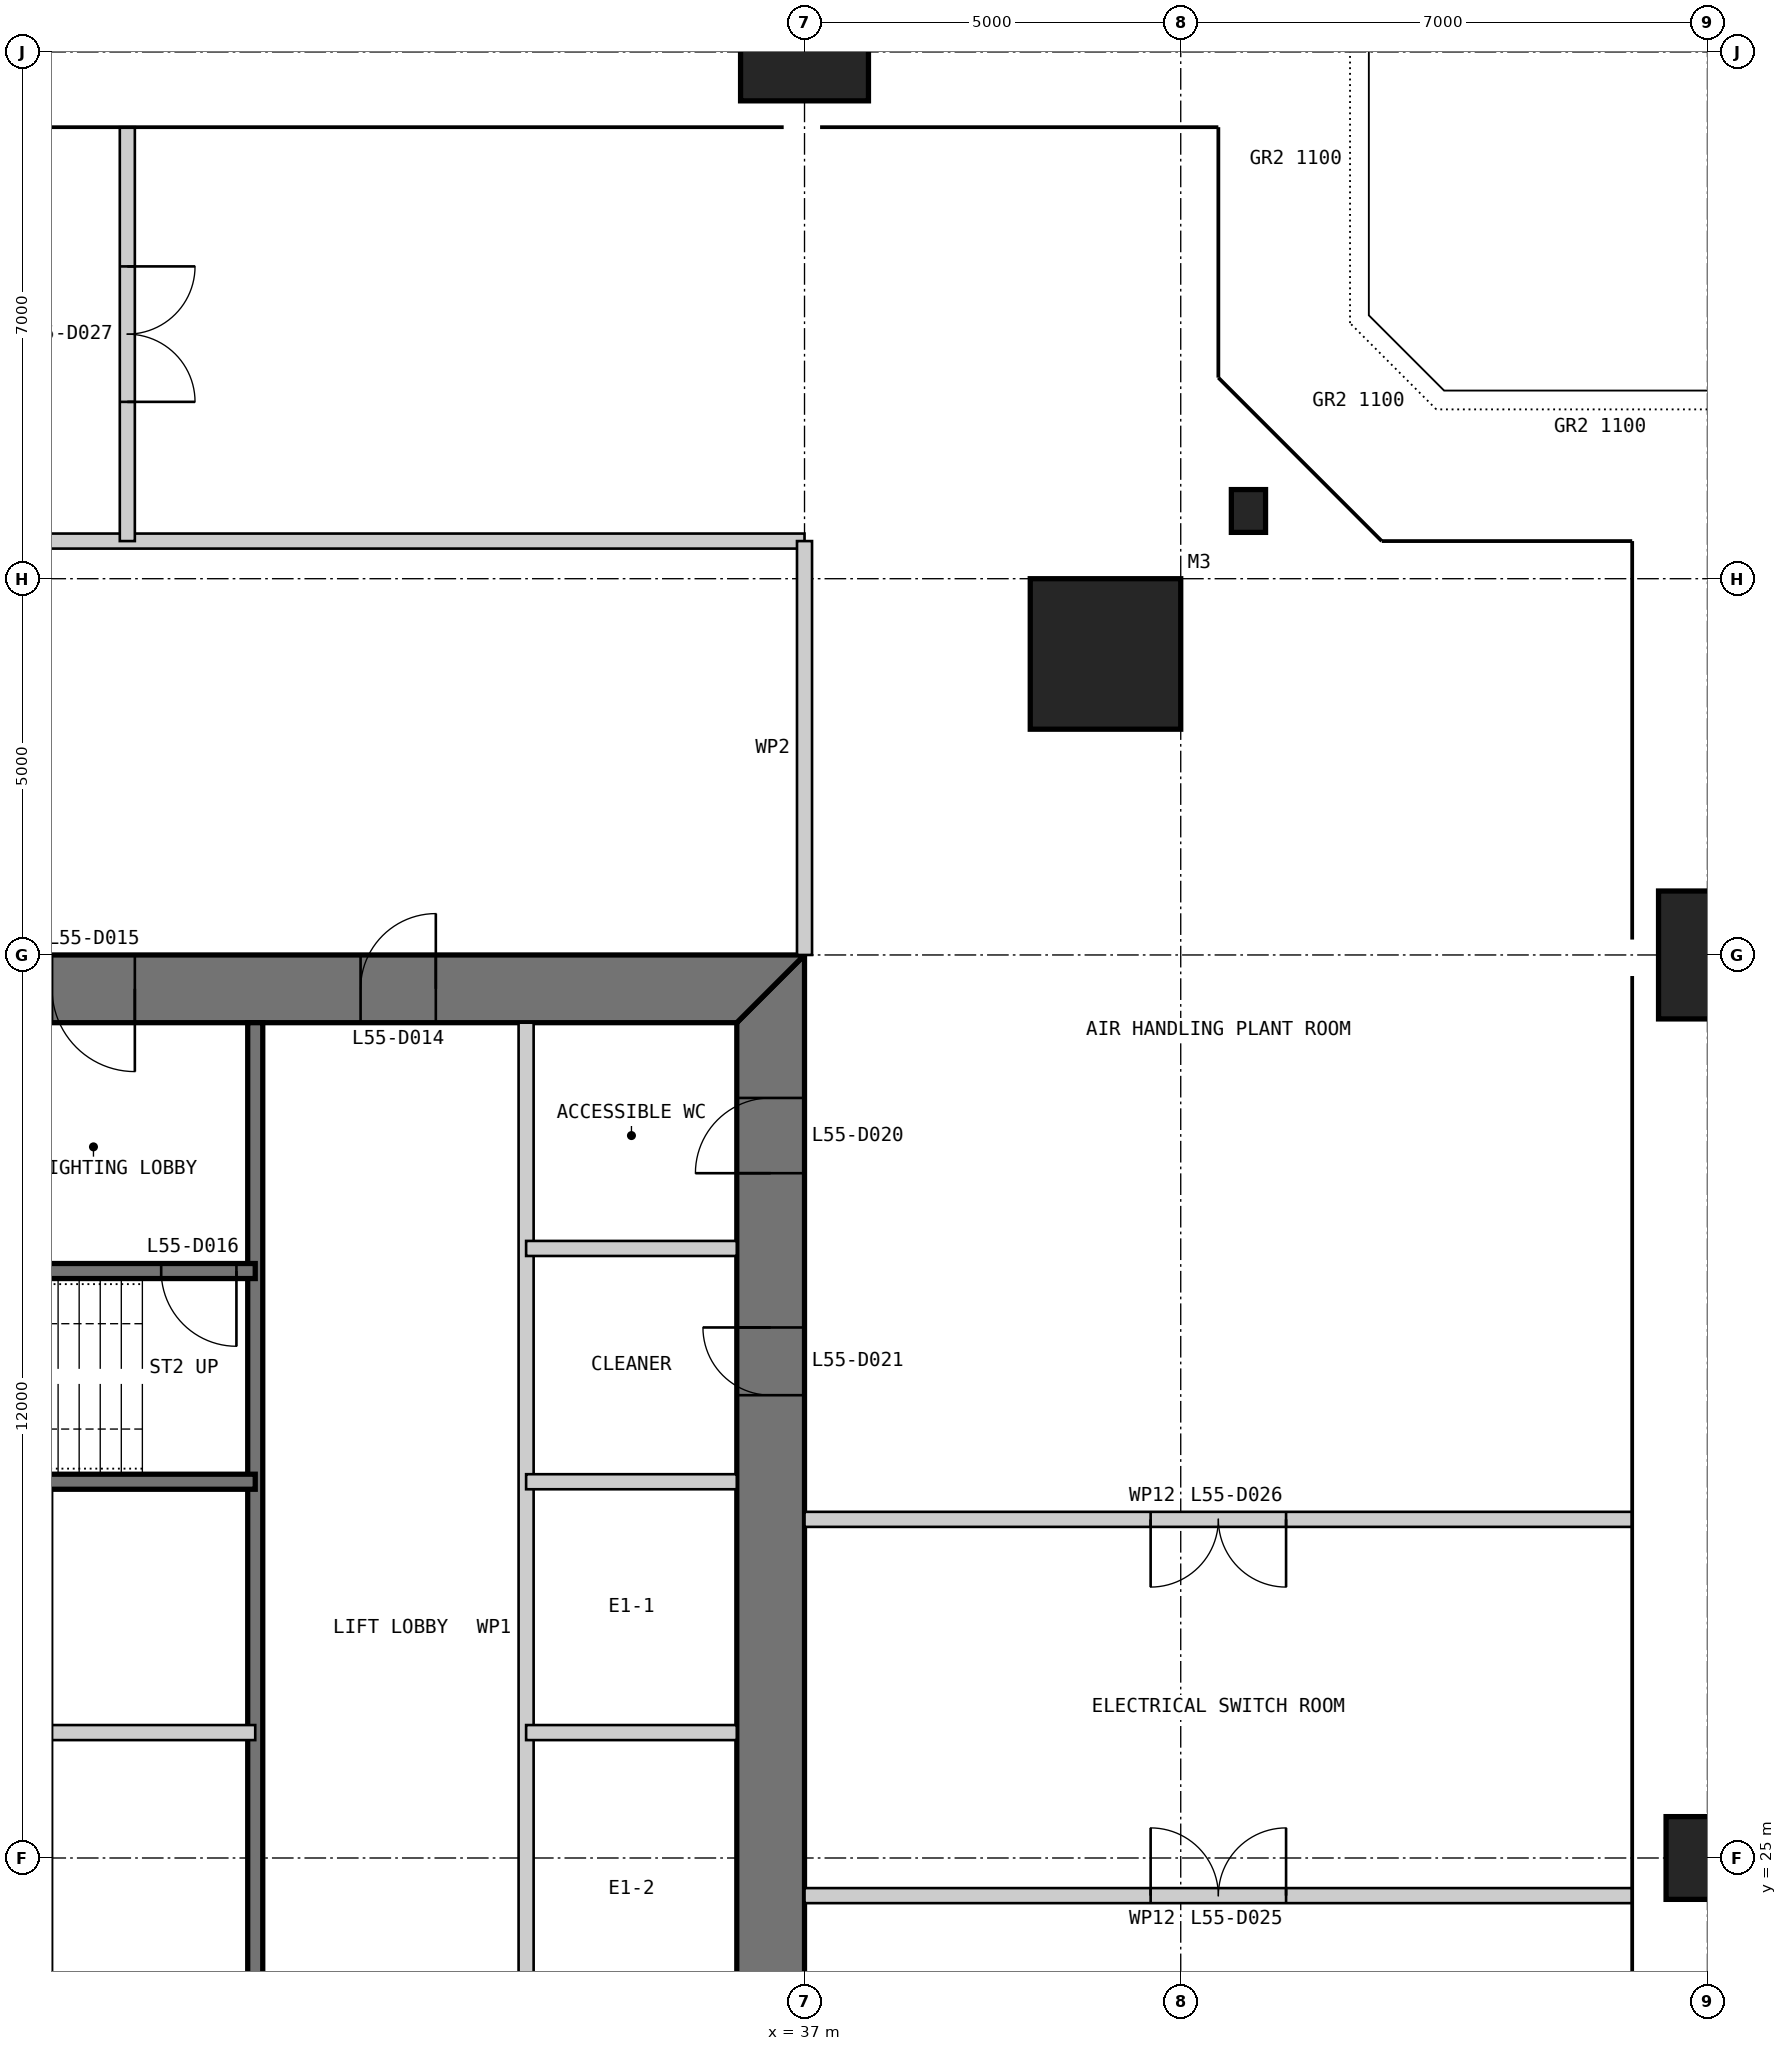
"""IFC4 building model, lengths in metres.
Left out: names, types, materials, properties, quantities, classifications, styles, units other than length and angle.
Written with IfcOpenShell. Run it as: python <this file> out.ifc"""

import sys

from ifc_helpers import new_model, si_unit, direction, frame, frame_2d, origin, origin_2d, place, context, subcontext, project, spatial, polyline, rectangle, i_section, outline, extrude, element, fill, save


model = new_model("IFC4")
c1 = context("Model", 3, precision=1e-05, world=origin(), true_north=direction((0.0, 1.0)))
c2 = subcontext(c1, "Body", "Model", "MODEL_VIEW")
j1 = project(units=[si_unit("LENGTHUNIT", "METRE"), si_unit("PLANEANGLEUNIT", "RADIAN")], contexts=[c1])
p1 = place(None, origin())
s1 = spatial("IfcSite", under=j1, at=p1, CompositionType="ELEMENT")
p2 = place(p1, origin())
s2 = spatial("IfcBuilding", under=s1, at=p2, CompositionType="ELEMENT")
p3 = place(p2, frame((0.0, 0.0, 233.8)))
s3 = spatial("IfcBuildingStorey", under=s2, at=p3, CompositionType="ELEMENT", Elevation=233.8)
p4 = place(p3, frame((41.0, 41.0, 0.0), z_axis=(0.0, 0.0, 1.0), x_axis=(1.0, 0.0, 0.0)))
e1 = element("IfcColumn", 1, at=p4, inside=s3, PredefinedType="COLUMN", context=c2, shape_type="SweptSolid", body=[
    extrude(rectangle(XDim=2.0, YDim=2.0, at=origin_2d()), origin(), (0.0, 0.0, 1.0), 6.0),
])
p5 = place(p3, frame((49.0, 25.0, 0.0), z_axis=(0.0, 0.0, 1.0), x_axis=(1.0, 0.0, 0.0)))
e2 = element("IfcColumn", 2, at=p5, inside=s3, PredefinedType="COLUMN", context=c2, shape_type="SweptSolid", body=[
    extrude(rectangle(XDim=1.1, YDim=1.1, at=origin_2d()), origin(), (0.0, 0.0, 1.0), 6.0),
])
p6 = place(p3, frame((49.0, 37.0, 0.0), z_axis=(0.0, 0.0, 1.0), x_axis=(1.0, 0.0, 0.0)))
e3 = element("IfcColumn", 3, at=p6, inside=s3, PredefinedType="COLUMN", context=c2, shape_type="SweptSolid", body=[
    extrude(rectangle(XDim=1.3, YDim=1.7, at=origin_2d()), origin(), (0.0, 0.0, 1.0), 6.0),
])
p7 = place(p3, frame((37.0, 49.0, 0.0), z_axis=(0.0, 0.0, 1.0), x_axis=(1.0, 0.0, 0.0)))
e4 = element("IfcColumn", 4, at=p7, inside=s3, PredefinedType="COLUMN", context=c2, shape_type="SweptSolid", body=[
    extrude(rectangle(XDim=1.7, YDim=1.3, at=origin_2d()), origin(), (0.0, 0.0, 1.0), 6.0),
])
p8 = place(p3, frame((42.9, 42.9, 0.0), z_axis=(0.0, 0.0, 1.0), x_axis=(1.0, 0.0, 0.0)))
e5 = element("IfcColumn", 5, at=p8, inside=s3, PredefinedType="COLUMN", context=c2, shape_type="SweptSolid", body=[
    extrude(i_section(OverallWidth=0.455, OverallDepth=0.569, WebThickness=0.078, FlangeThickness=0.125, at=origin_2d()), origin(), (0.0, 0.0, 1.0), 4.6),
])
p9 = place(p3, frame((36.55, 13.9, 0.0), z_axis=(0.0, 0.0, 1.0), x_axis=(0.0, 1.0, 0.0)))
e6 = element("IfcWall", 6, at=p9, inside=s3, PredefinedType="SHEAR", context=c2, shape_type="SweptSolid", body=[
    extrude(outline(polyline([(-0.9, -0.45), (23.1, -0.45), (22.2, 0.45), (0.0, 0.45), (-0.9, -0.45)])), origin(), (0.0, 0.0, 1.0), 6.0),
])
p10 = place(p9, frame((20.2, 0.0, 0.0)))
e7 = element("IfcOpeningElement", 7, at=p10, cuts=e6, PredefinedType="OPENING", context=c2, shape_type="SweptSolid", body=[
    extrude(rectangle(XDim=1.0, YDim=2.2, at=frame_2d((0.5, 1.1))), frame((0.0, 0.46, 0.0), z_axis=(0.0, -1.0, 0.0), x_axis=(1.0, 0.0, 0.0)), (0.0, 0.0, 1.0), 0.92),
])
p11 = place(p9, frame((17.25, 0.0, 0.0)))
e8 = element("IfcOpeningElement", 8, at=p11, cuts=e6, PredefinedType="OPENING", context=c2, shape_type="SweptSolid", body=[
    extrude(rectangle(XDim=0.9, YDim=2.2, at=frame_2d((0.45, 1.1))), frame((0.0, 0.46, 0.0), z_axis=(0.0, -1.0, 0.0), x_axis=(1.0, 0.0, 0.0)), (0.0, 0.0, 1.0), 0.92),
])
p12 = place(p3, frame((37.0, 36.55, 0.0), z_axis=(0.0, 0.0, 1.0), x_axis=(-1.0, 0.0, 0.0)))
e9 = element("IfcWall", 9, at=p12, inside=s3, PredefinedType="SHEAR", context=c2, shape_type="SweptSolid", body=[
    extrude(outline(polyline([(0.0, -0.45), (24.0, -0.45), (23.1, 0.45), (0.9, 0.45), (0.0, -0.45)])), origin(), (0.0, 0.0, 1.0), 6.0),
])
p13 = place(p12, frame((4.9, 0.0, 0.0)))
e10 = element("IfcOpeningElement", 10, at=p13, cuts=e9, PredefinedType="OPENING", context=c2, shape_type="SweptSolid", body=[
    extrude(rectangle(XDim=1.0, YDim=2.2, at=frame_2d((0.5, 1.1))), frame((0.0, 0.46, 0.0), z_axis=(0.0, -1.0, 0.0), x_axis=(1.0, 0.0, 0.0)), (0.0, 0.0, 1.0), 0.92),
])
p14 = place(p12, frame((8.9, 0.0, 0.0)))
e11 = element("IfcOpeningElement", 11, at=p14, cuts=e9, PredefinedType="OPENING", context=c2, shape_type="SweptSolid", body=[
    extrude(rectangle(XDim=1.1, YDim=2.2, at=frame_2d((0.55, 1.1))), frame((0.0, 0.46, 0.0), z_axis=(0.0, -1.0, 0.0), x_axis=(1.0, 0.0, 0.0)), (0.0, 0.0, 1.0), 0.92),
])
p15 = place(p12, frame((15.05, 0.0, 0.0)))
e12 = element("IfcOpeningElement", 12, at=p15, cuts=e9, PredefinedType="OPENING", context=c2, shape_type="SweptSolid", body=[
    extrude(rectangle(XDim=0.9, YDim=2.2, at=frame_2d((0.45, 1.1))), frame((0.0, 0.46, 0.0), z_axis=(0.0, -1.0, 0.0), x_axis=(1.0, 0.0, 0.0)), (0.0, 0.0, 1.0), 0.92),
])
p16 = place(p12, frame((17.9, 0.0, 0.0)))
e13 = element("IfcOpeningElement", 13, at=p16, cuts=e9, PredefinedType="OPENING", context=c2, shape_type="SweptSolid", body=[
    extrude(rectangle(XDim=1.0, YDim=2.2, at=frame_2d((0.5, 1.1))), frame((0.0, 0.46, 0.0), z_axis=(0.0, -1.0, 0.0), x_axis=(1.0, 0.0, 0.0)), (0.0, 0.0, 1.0), 0.92),
])
p17 = place(p12, frame((21.4, 0.0, 0.0)))
e14 = element("IfcOpeningElement", 14, at=p17, cuts=e9, PredefinedType="OPENING", context=c2, shape_type="SweptSolid", body=[
    extrude(rectangle(XDim=1.0, YDim=2.2, at=frame_2d((0.5, 1.1))), frame((0.0, 0.46, 0.0), z_axis=(0.0, -1.0, 0.0), x_axis=(1.0, 0.0, 0.0)), (0.0, 0.0, 1.0), 0.92),
])
p18 = place(p3, frame((33.3, 36.1, 0.0), z_axis=(0.0, 0.0, 1.0), x_axis=(0.0, -1.0, 0.0)))
e15 = element("IfcWall", 15, at=p18, inside=s3, PredefinedType="PARTITIONING", context=c2, shape_type="SweptSolid", body=[
    extrude(rectangle(XDim=16.1, YDim=0.2, at=frame_2d((8.05, 0.0))), origin(), (0.0, 0.0, 1.0), 5.8),
])
p19 = place(p3, frame((29.7, 36.1, 0.0), z_axis=(0.0, 0.0, 1.0), x_axis=(0.0, -1.0, 0.0)))
e16 = element("IfcWall", 16, at=p19, inside=s3, PredefinedType="SOLIDWALL", context=c2, shape_type="SweptSolid", body=[
    extrude(rectangle(XDim=16.1, YDim=0.2, at=frame_2d((8.05, 0.0))), origin(), (0.0, 0.0, 1.0), 5.8),
])
for number, where, z_axis, x_axis in (
    (17, (36.1, 30.0, 0.0), (0.0, 0.0, 1.0), (-1.0, 0.0, 0.0)),
    (18, (36.1, 26.667, 0.0), (0.0, 0.0, 1.0), (-1.0, 0.0, 0.0)),
    (19, (29.7, 26.667, 0.0), (0.0, 0.0, 1.0), (-1.0, 0.0, 0.0)),
):
    element("IfcWall", number, at=place(p3, frame(where, z_axis=z_axis, x_axis=x_axis)), inside=s3, PredefinedType="PARTITIONING", context=c2, shape_type="SweptSolid", body=[
        extrude(rectangle(XDim=2.8, YDim=0.2, at=frame_2d((1.4, 0.0))), origin(), (0.0, 0.0, 1.0), 5.8),
    ])
p20 = place(p3, frame((29.7, 32.8, 0.0), z_axis=(0.0, 0.0, 1.0), x_axis=(-1.0, 0.0, 0.0)))
e20 = element("IfcWall", 20, at=p20, inside=s3, PredefinedType="SOLIDWALL", context=c2, shape_type="SweptSolid", body=[
    extrude(rectangle(XDim=9.4, YDim=0.2, at=frame_2d((4.7, 0.0))), origin(), (0.0, 0.0, 1.0), 5.8),
])
p21 = place(p20, frame((0.25, 0.0, 0.0)))
e21 = element("IfcOpeningElement", 21, at=p21, cuts=e20, PredefinedType="OPENING", context=c2, shape_type="SweptSolid", body=[
    extrude(rectangle(XDim=1.0, YDim=2.2, at=frame_2d((0.5, 1.1))), frame((0.0, 0.11, 0.0), z_axis=(0.0, -1.0, 0.0), x_axis=(1.0, 0.0, 0.0)), (0.0, 0.0, 1.0), 0.22),
])
p22 = place(p3, frame((29.7, 30.0, 0.0), z_axis=(0.0, 0.0, 1.0), x_axis=(-1.0, 0.0, 0.0)))
e22 = element("IfcWall", 22, at=p22, inside=s3, PredefinedType="SOLIDWALL", context=c2, shape_type="SweptSolid", body=[
    extrude(rectangle(XDim=15.8, YDim=0.2, at=frame_2d((7.9, 0.0))), origin(), (0.0, 0.0, 1.0), 5.8),
])
p23 = place(p3, frame((36.1, 33.1, 0.0), z_axis=(0.0, 0.0, 1.0), x_axis=(-1.0, 0.0, 0.0)))
e23 = element("IfcWall", 23, at=p23, inside=s3, PredefinedType="PARTITIONING", context=c2, shape_type="SweptSolid", body=[
    extrude(rectangle(XDim=2.8, YDim=0.2, at=frame_2d((1.4, 0.0))), origin(), (0.0, 0.0, 1.0), 5.8),
])
p24 = place(p3, frame((13.0, 42.5, 0.0), z_axis=(0.0, 0.0, 1.0), x_axis=(1.0, 0.0, 0.0)))
e24 = element("IfcWall", 24, at=p24, inside=s3, PredefinedType="PARTITIONING", context=c2, shape_type="SweptSolid", body=[
    extrude(rectangle(XDim=24.0, YDim=0.2, at=frame_2d((12.0, 0.0))), origin(), (0.0, 0.0, 1.0), 5.8),
])
p25 = place(p24, frame((8.0, 0.0, 0.0)))
e25 = element("IfcOpeningElement", 25, at=p25, cuts=e24, PredefinedType="OPENING", context=c2, shape_type="SweptSolid", body=[
    extrude(rectangle(XDim=1.0, YDim=2.2, at=frame_2d((0.5, 1.1))), frame((0.0, 0.11, 0.0), z_axis=(0.0, -1.0, 0.0), x_axis=(1.0, 0.0, 0.0)), (0.0, 0.0, 1.0), 0.22),
])
p26 = place(p3, frame((37.0, 42.5, 0.0), z_axis=(0.0, 0.0, 1.0), x_axis=(0.0, -1.0, 0.0)))
e26 = element("IfcWall", 26, at=p26, inside=s3, PredefinedType="PARTITIONING", context=c2, shape_type="SweptSolid", body=[
    extrude(rectangle(XDim=5.5, YDim=0.2, at=frame_2d((2.75, 0.0))), origin(), (0.0, 0.0, 1.0), 4.705),
])
p27 = place(p3, frame((37.0, 24.5, 0.0), z_axis=(0.0, 0.0, 1.0), x_axis=(1.0, 0.0, 0.0)))
e27 = element("IfcWall", 27, at=p27, inside=s3, PredefinedType="PARTITIONING", context=c2, shape_type="SweptSolid", body=[
    extrude(rectangle(XDim=11.0, YDim=0.2, at=frame_2d((5.5, 0.0))), origin(), (0.0, 0.0, 1.0), 5.8),
])
p28 = place(p27, frame((4.6, 0.0, 0.0)))
e28 = element("IfcOpeningElement", 28, at=p28, cuts=e27, PredefinedType="OPENING", context=c2, shape_type="SweptSolid", body=[
    extrude(rectangle(XDim=1.8, YDim=2.4, at=frame_2d((0.9, 1.2))), frame((0.0, 0.11, 0.0), z_axis=(0.0, -1.0, 0.0), x_axis=(1.0, 0.0, 0.0)), (0.0, 0.0, 1.0), 0.22),
])
p29 = place(p3, frame((37.0, 29.5, 0.0), z_axis=(0.0, 0.0, 1.0), x_axis=(1.0, 0.0, 0.0)))
e29 = element("IfcWall", 29, at=p29, inside=s3, PredefinedType="PARTITIONING", context=c2, shape_type="SweptSolid", body=[
    extrude(rectangle(XDim=11.0, YDim=0.2, at=frame_2d((5.5, 0.0))), origin(), (0.0, 0.0, 1.0), 5.8),
])
p30 = place(p29, frame((4.6, 0.0, 0.0)))
e30 = element("IfcOpeningElement", 30, at=p30, cuts=e29, PredefinedType="OPENING", context=c2, shape_type="SweptSolid", body=[
    extrude(rectangle(XDim=1.8, YDim=2.4, at=frame_2d((0.9, 1.2))), frame((0.0, 0.11, 0.0), z_axis=(0.0, -1.0, 0.0), x_axis=(1.0, 0.0, 0.0)), (0.0, 0.0, 1.0), 0.22),
])
p31 = place(p3, frame((28.0, 42.5, 0.0), z_axis=(0.0, 0.0, 1.0), x_axis=(0.0, 1.0, 0.0)))
e31 = element("IfcWall", 31, at=p31, inside=s3, PredefinedType="PARTITIONING", context=c2, shape_type="SweptSolid", body=[
    extrude(rectangle(XDim=5.5, YDim=0.2, at=frame_2d((2.75, 0.0))), origin(), (0.0, 0.0, 1.0), 4.954),
])
p32 = place(p31, frame((1.85, 0.0, 0.0)))
e32 = element("IfcOpeningElement", 32, at=p32, cuts=e31, PredefinedType="OPENING", context=c2, shape_type="SweptSolid", body=[
    extrude(rectangle(XDim=1.8, YDim=2.4, at=frame_2d((0.9, 1.2))), frame((0.0, 0.11, 0.0), z_axis=(0.0, -1.0, 0.0), x_axis=(1.0, 0.0, 0.0)), (0.0, 0.0, 1.0), 0.22),
])
p33 = place(p13, frame((1.0, 0.0, 0.0), z_axis=(0.0, 0.0, 1.0), x_axis=(-1.0, 0.0, 0.0)))
e33 = element("IfcDoor", 33, at=p33, inside=s3, OperationType="SINGLE_SWING_RIGHT", PredefinedType="DOOR", context=c2, shape_type="SweptSolid", body=[
    extrude(rectangle(XDim=1.0, YDim=2.2, at=frame_2d((0.5, 1.1))), frame((0.0, 0.025, 0.0), z_axis=(0.0, -1.0, 0.0), x_axis=(1.0, 0.0, 0.0)), (0.0, 0.0, 1.0), 0.05),
    extrude(outline(polyline([(0.0, 0.0), (0.04, 0.0), (0.04, 2.16), (0.96, 2.16), (0.96, 0.0), (1.0, 0.0), (1.0, 2.2), (0.0, 2.2), (0.0, 0.0)])), frame((0.0, 0.3, 0.0), z_axis=(0.0, -1.0, 0.0), x_axis=(1.0, 0.0, 0.0)), (0.0, 0.0, 1.0), 0.6),
])
fill(e10, e33)
p34 = place(p14, origin())
e34 = element("IfcDoor", 34, at=p34, inside=s3, OperationType="SINGLE_SWING_LEFT", PredefinedType="DOOR", context=c2, shape_type="SweptSolid", body=[
    extrude(rectangle(XDim=1.1, YDim=2.2, at=frame_2d((0.55, 1.1))), frame((0.0, 0.025, 0.0), z_axis=(0.0, -1.0, 0.0), x_axis=(1.0, 0.0, 0.0)), (0.0, 0.0, 1.0), 0.05),
    extrude(outline(polyline([(0.0, 0.0), (0.04, 0.0), (0.04, 2.16), (1.06, 2.16), (1.06, 0.0), (1.1, 0.0), (1.1, 2.2), (0.0, 2.2), (0.0, 0.0)])), frame((0.0, 0.3, 0.0), z_axis=(0.0, -1.0, 0.0), x_axis=(1.0, 0.0, 0.0)), (0.0, 0.0, 1.0), 0.6),
])
fill(e11, e34)
p35 = place(p21, origin())
e35 = element("IfcDoor", 35, at=p35, inside=s3, OperationType="SINGLE_SWING_LEFT", PredefinedType="DOOR", context=c2, shape_type="SweptSolid", body=[
    extrude(rectangle(XDim=1.0, YDim=2.2, at=frame_2d((0.5, 1.1))), frame((0.0, 0.025, 0.0), z_axis=(0.0, -1.0, 0.0), x_axis=(1.0, 0.0, 0.0)), (0.0, 0.0, 1.0), 0.05),
])
fill(e21, e35)
p36 = place(p10, origin())
e36 = element("IfcDoor", 36, at=p36, inside=s3, OperationType="SINGLE_SWING_LEFT", PredefinedType="DOOR", context=c2, shape_type="SweptSolid", body=[
    extrude(rectangle(XDim=1.0, YDim=2.2, at=frame_2d((0.5, 1.1))), frame((0.0, 0.025, 0.0), z_axis=(0.0, -1.0, 0.0), x_axis=(1.0, 0.0, 0.0)), (0.0, 0.0, 1.0), 0.05),
    extrude(outline(polyline([(0.0, 0.0), (0.04, 0.0), (0.04, 2.16), (0.96, 2.16), (0.96, 0.0), (1.0, 0.0), (1.0, 2.2), (0.0, 2.2), (0.0, 0.0)])), frame((0.0, 0.3, 0.0), z_axis=(0.0, -1.0, 0.0), x_axis=(1.0, 0.0, 0.0)), (0.0, 0.0, 1.0), 0.6),
])
fill(e7, e36)
p37 = place(p11, origin())
e37 = element("IfcDoor", 37, at=p37, inside=s3, OperationType="SINGLE_SWING_RIGHT", PredefinedType="DOOR", context=c2, shape_type="SweptSolid", body=[
    extrude(rectangle(XDim=0.9, YDim=2.2, at=frame_2d((0.45, 1.1))), frame((0.0, 0.025, 0.0), z_axis=(0.0, -1.0, 0.0), x_axis=(1.0, 0.0, 0.0)), (0.0, 0.0, 1.0), 0.05),
    extrude(outline(polyline([(0.0, 0.0), (0.04, 0.0), (0.04, 2.16), (0.86, 2.16), (0.86, 0.0), (0.9, 0.0), (0.9, 2.2), (0.0, 2.2), (0.0, 0.0)])), frame((0.0, 0.3, 0.0), z_axis=(0.0, -1.0, 0.0), x_axis=(1.0, 0.0, 0.0)), (0.0, 0.0, 1.0), 0.6),
])
fill(e8, e37)
p38 = place(p28, origin())
e38 = element("IfcDoor", 38, at=p38, inside=s3, OperationType="DOUBLE_DOOR_SINGLE_SWING", PredefinedType="DOOR", context=c2, shape_type="SweptSolid", body=[
    extrude(rectangle(XDim=1.8, YDim=2.4, at=frame_2d((0.9, 1.2))), frame((0.0, 0.025, 0.0), z_axis=(0.0, -1.0, 0.0), x_axis=(1.0, 0.0, 0.0)), (0.0, 0.0, 1.0), 0.05),
])
fill(e28, e38)
p39 = place(p30, frame((1.8, 0.0, 0.0), z_axis=(0.0, 0.0, 1.0), x_axis=(-1.0, 0.0, 0.0)))
e39 = element("IfcDoor", 39, at=p39, inside=s3, OperationType="DOUBLE_DOOR_SINGLE_SWING", PredefinedType="DOOR", context=c2, shape_type="SweptSolid", body=[
    extrude(rectangle(XDim=1.8, YDim=2.4, at=frame_2d((0.9, 1.2))), frame((0.0, 0.025, 0.0), z_axis=(0.0, -1.0, 0.0), x_axis=(1.0, 0.0, 0.0)), (0.0, 0.0, 1.0), 0.05),
])
fill(e30, e39)
p40 = place(p32, frame((1.8, 0.0, 0.0), z_axis=(0.0, 0.0, 1.0), x_axis=(-1.0, 0.0, 0.0)))
e40 = element("IfcDoor", 40, at=p40, inside=s3, OperationType="DOUBLE_DOOR_SINGLE_SWING", PredefinedType="DOOR", context=c2, shape_type="SweptSolid", body=[
    extrude(rectangle(XDim=1.8, YDim=2.4, at=frame_2d((0.9, 1.2))), frame((0.0, 0.025, 0.0), z_axis=(0.0, -1.0, 0.0), x_axis=(1.0, 0.0, 0.0)), (0.0, 0.0, 1.0), 0.05),
])
fill(e32, e40)
save(model, sys.argv[1])
